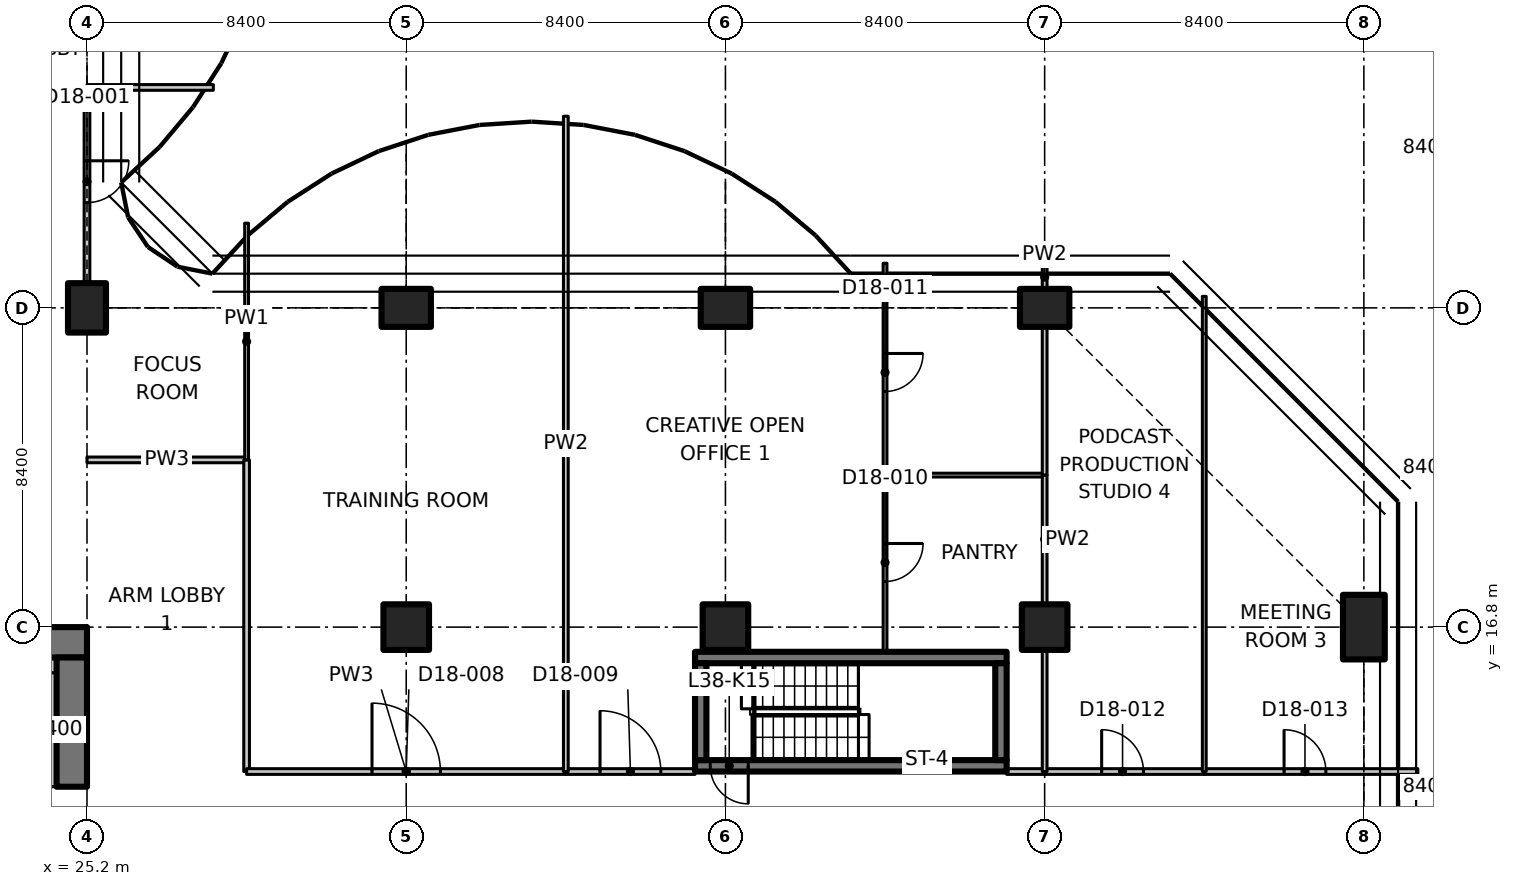
"""IFC4 building model, lengths in metres.
Left out: names, types, materials, properties, quantities, classifications, styles, units other than length and angle.
Written with IfcOpenShell. Run it as: python <this file> out.ifc"""

import sys

from ifc_helpers import new_model, si_unit, direction, frame, frame_2d, origin, origin_2d, place, context, subcontext, project, spatial, polyline, rectangle, outline, extrude, element, fill, save


model = new_model("IFC4")
c1 = context("Model", 3, precision=1e-05, world=origin(), true_north=direction((0.0, 1.0)))
c2 = subcontext(c1, "Body", "Model", "MODEL_VIEW")
j1 = project(units=[si_unit("LENGTHUNIT", "METRE"), si_unit("PLANEANGLEUNIT", "RADIAN")], contexts=[c1])
p1 = place(None, origin())
s1 = spatial("IfcSite", under=j1, at=p1, CompositionType="ELEMENT")
p2 = place(p1, origin())
s2 = spatial("IfcBuilding", under=s1, at=p2, CompositionType="ELEMENT")
p3 = place(p2, frame((0.0, 0.0, 152.9)))
s3 = spatial("IfcBuildingStorey", under=s2, at=p3, CompositionType="ELEMENT", Elevation=152.9)
p4 = place(p3, frame((25.2, 25.2, 0.0), z_axis=(0.0, 0.0, 1.0), x_axis=(1.0, 0.0, 0.0)))
e1 = element("IfcColumn", 1, at=p4, inside=s3, PredefinedType="COLUMN", context=c2, shape_type="SweptSolid", body=[
    extrude(rectangle(XDim=1.0, YDim=1.3, at=origin_2d()), origin(), (0.0, 0.0, 1.0), 3.3),
])
p5 = place(p3, frame((33.6, 16.8, 0.0), z_axis=(0.0, 0.0, 1.0), x_axis=(1.0, 0.0, 0.0)))
e2 = element("IfcColumn", 2, at=p5, inside=s3, PredefinedType="COLUMN", context=c2, shape_type="SweptSolid", body=[
    extrude(rectangle(XDim=1.2, YDim=1.2, at=origin_2d()), origin(), (0.0, 0.0, 1.0), 3.3),
])
p6 = place(p3, frame((33.6, 25.2, 0.0), z_axis=(0.0, 0.0, 1.0), x_axis=(0.0, 1.0, 0.0)))
e3 = element("IfcColumn", 3, at=p6, inside=s3, PredefinedType="COLUMN", context=c2, shape_type="SweptSolid", body=[
    extrude(rectangle(XDim=1.0, YDim=1.3, at=origin_2d()), origin(), (0.0, 0.0, 1.0), 3.3),
])
p7 = place(p3, frame((42.0, 16.8, 0.0), z_axis=(0.0, 0.0, 1.0), x_axis=(1.0, 0.0, 0.0)))
e4 = element("IfcColumn", 4, at=p7, inside=s3, PredefinedType="COLUMN", context=c2, shape_type="SweptSolid", body=[
    extrude(rectangle(XDim=1.2, YDim=1.2, at=origin_2d()), origin(), (0.0, 0.0, 1.0), 3.3),
])
p8 = place(p3, frame((42.0, 25.2, 0.0), z_axis=(0.0, 0.0, 1.0), x_axis=(0.0, 1.0, 0.0)))
e5 = element("IfcColumn", 5, at=p8, inside=s3, PredefinedType="COLUMN", context=c2, shape_type="SweptSolid", body=[
    extrude(rectangle(XDim=1.0, YDim=1.3, at=origin_2d()), origin(), (0.0, 0.0, 1.0), 3.3),
])
p9 = place(p3, frame((50.4, 16.8, 0.0), z_axis=(0.0, 0.0, 1.0), x_axis=(1.0, 0.0, 0.0)))
e6 = element("IfcColumn", 6, at=p9, inside=s3, PredefinedType="COLUMN", context=c2, shape_type="SweptSolid", body=[
    extrude(rectangle(XDim=1.2, YDim=1.2, at=origin_2d()), origin(), (0.0, 0.0, 1.0), 3.3),
])
p10 = place(p3, frame((50.4, 25.2, 0.0), z_axis=(0.0, 0.0, 1.0), x_axis=(0.0, 1.0, 0.0)))
e7 = element("IfcColumn", 7, at=p10, inside=s3, PredefinedType="COLUMN", context=c2, shape_type="SweptSolid", body=[
    extrude(rectangle(XDim=1.0, YDim=1.3, at=origin_2d()), origin(), (0.0, 0.0, 1.0), 3.3),
])
p11 = place(p3, frame((58.8, 16.8, 0.0), z_axis=(0.0, 0.0, 1.0), x_axis=(1.0, 0.0, 0.0)))
e8 = element("IfcColumn", 8, at=p11, inside=s3, PredefinedType="COLUMN", context=c2, shape_type="SweptSolid", body=[
    extrude(rectangle(XDim=1.1, YDim=1.7, at=origin_2d()), origin(), (0.0, 0.0, 1.0), 3.3),
])
p12 = place(p3, frame((23.8, 16.4, 0.0), z_axis=(0.0, 0.0, 1.0), x_axis=(1.0, 0.0, 0.0)))
e9 = element("IfcWall", 9, at=p12, inside=s3, PredefinedType="SHEAR", context=c2, shape_type="SweptSolid", body=[
    extrude(rectangle(XDim=1.4, YDim=0.8, at=frame_2d((0.7, 0.0))), origin(), (0.0, 0.0, 1.0), 3.3),
])
p13 = place(p3, frame((24.8, 12.6, 0.0), z_axis=(0.0, 0.0, 1.0), x_axis=(0.0, 1.0, 0.0)))
e10 = element("IfcWall", 10, at=p13, inside=s3, PredefinedType="SHEAR", context=c2, shape_type="SweptSolid", body=[
    extrude(rectangle(XDim=3.4, YDim=0.8, at=frame_2d((1.7, 0.0))), origin(), (0.0, 0.0, 1.0), 3.3),
])
p14 = place(p3, frame((24.2, 12.6, 0.0), z_axis=(0.0, 0.0, 1.0), x_axis=(0.0, 1.0, 0.0)))
e11 = element("IfcWall", 11, at=p14, inside=s3, PredefinedType="PARTITIONING", context=c2, shape_type="SweptSolid", body=[
    extrude(rectangle(XDim=3.0, YDim=0.4, at=frame_2d((1.5, 0.0))), origin(), (0.0, 0.0, 1.0), 3.3),
])
p15 = place(p3, frame((23.8, 15.8, 0.0), z_axis=(0.0, 0.0, 1.0), x_axis=(1.0, 0.0, 0.0)))
e12 = element("IfcWall", 12, at=p15, inside=s3, PredefinedType="PARTITIONING", context=c2, shape_type="SweptSolid", body=[
    extrude(rectangle(XDim=0.6, YDim=0.4, at=frame_2d((0.3, 0.0))), origin(), (0.0, 0.0, 1.0), 3.3),
])
p16 = place(p3, frame((49.4, 13.15, 0.0), z_axis=(0.0, 0.0, 1.0), x_axis=(-1.0, 0.0, 0.0)))
e13 = element("IfcWall", 13, at=p16, inside=s3, PredefinedType="SHEAR", context=c2, shape_type="SweptSolid", body=[
    extrude(rectangle(XDim=8.2, YDim=0.3, at=frame_2d((4.1, 0.0))), origin(), (0.0, 0.0, 1.0), 3.3),
])
p17 = place(p16, frame((6.8, 0.0, 0.0)))
e14 = element("IfcOpeningElement", 14, at=p17, cuts=e13, PredefinedType="OPENING", context=c2, shape_type="SweptSolid", body=[
    extrude(rectangle(XDim=1.0, YDim=2.1, at=frame_2d((0.5, 1.05))), frame((0.0, 0.16, 0.0), z_axis=(0.0, -1.0, 0.0), x_axis=(1.0, 0.0, 0.0)), (0.0, 0.0, 1.0), 0.32),
])
p18 = place(p3, frame((41.2, 16.0, 0.0), z_axis=(0.0, 0.0, 1.0), x_axis=(1.0, 0.0, 0.0)))
e15 = element("IfcWall", 15, at=p18, inside=s3, PredefinedType="SHEAR", context=c2, shape_type="SweptSolid", body=[
    extrude(rectangle(XDim=8.2, YDim=0.3, at=frame_2d((4.1, 0.0))), origin(), (0.0, 0.0, 1.0), 3.3),
])
for number, where, z_axis, x_axis in (
    (16, (41.35, 13.3, 0.0), (0.0, 0.0, 1.0), (0.0, 1.0, 0.0)),
    (17, (49.25, 13.3, 0.0), (0.0, 0.0, 1.0), (0.0, 1.0, 0.0)),
):
    element("IfcWall", number, at=place(p3, frame(where, z_axis=z_axis, x_axis=x_axis)), inside=s3, PredefinedType="SHEAR", context=c2, shape_type="SweptSolid", body=[
        extrude(rectangle(XDim=2.55, YDim=0.3, at=frame_2d((1.275, 0.0))), origin(), (0.0, 0.0, 1.0), 3.3),
    ])
p19 = place(p3, frame((25.2, 21.2, 0.0), z_axis=(0.0, 0.0, 1.0), x_axis=(1.0, 0.0, 0.0)))
e18 = element("IfcWall", 18, at=p19, inside=s3, PredefinedType="PARTITIONING", context=c2, shape_type="SweptSolid", body=[
    extrude(rectangle(XDim=4.2, YDim=0.15, at=frame_2d((2.1, 0.0))), origin(), (0.0, 0.0, 1.0), 3.28),
])
p20 = place(p3, frame((29.4, 21.2, 0.0), z_axis=(0.0, 0.0, 1.0), x_axis=(0.0, -1.0, 0.0)))
e19 = element("IfcWall", 19, at=p20, inside=s3, PredefinedType="PARTITIONING", context=c2, shape_type="SweptSolid", body=[
    extrude(rectangle(XDim=8.2, YDim=0.15, at=frame_2d((4.1, 0.0))), origin(), (0.0, 0.0, 1.0), 3.28),
])
p21 = place(p3, frame((29.4, 27.429, 0.0), z_axis=(0.0, 0.0, 1.0), x_axis=(0.0, -1.0, 0.0)))
e20 = element("IfcWall", 20, at=p21, inside=s3, PredefinedType="PARTITIONING", context=c2, shape_type="SweptSolid", body=[
    extrude(outline(polyline([(0.0, 0.0), (6.229, 0.0), (6.229, 3.28), (2.679, 3.28), (2.677, 2.93), (1.781, 2.93), (1.779, 3.28), (0.154, 3.28), (0.0, 3.28), (0.0, 0.0)])), frame((0.0, 0.05, 0.0), z_axis=(0.0, -1.0, 0.0), x_axis=(1.0, 0.0, 0.0)), (0.0, 0.0, 1.0), 0.1),
])
p22 = place(p3, frame((25.2, 31.0, 0.0), z_axis=(0.0, 0.0, 1.0), x_axis=(0.0, -1.0, 0.0)))
e21 = element("IfcWall", 21, at=p22, inside=s3, PredefinedType="PARTITIONING", context=c2, shape_type="SweptSolid", body=[
    extrude(outline(polyline([(0.0, 0.0), (5.13, 0.0), (5.13, 2.93), (0.0, 2.93), (0.0, 0.0)])), frame((0.0, 0.075, 0.0), z_axis=(0.0, -1.0, 0.0), x_axis=(1.0, 0.0, 0.0)), (0.0, 0.0, 1.0), 0.15),
])
p23 = place(p22, frame((1.93, 0.0, 0.0)))
e22 = element("IfcOpeningElement", 22, at=p23, cuts=e21, PredefinedType="OPENING", context=c2, shape_type="SweptSolid", body=[
    extrude(rectangle(XDim=1.1, YDim=2.1, at=frame_2d((0.55, 1.05))), frame((0.0, 0.085, 0.0), z_axis=(0.0, -1.0, 0.0), x_axis=(1.0, 0.0, 0.0)), (0.0, 0.0, 1.0), 0.17),
])
p24 = place(p3, frame((25.2, 31.0, 0.0), z_axis=(0.0, 0.0, 1.0), x_axis=(1.0, 0.0, 0.0)))
e23 = element("IfcWall", 23, at=p24, inside=s3, PredefinedType="PARTITIONING", context=c2, shape_type="SweptSolid", body=[
    extrude(rectangle(XDim=3.324, YDim=0.15, at=frame_2d((1.662, 0.0))), origin(), (0.0, 0.0, 1.0), 2.93),
])
p25 = place(p3, frame((29.4, 13.0, 0.0), z_axis=(0.0, 0.0, 1.0), x_axis=(1.0, 0.0, 0.0)))
e24 = element("IfcWall", 24, at=p25, inside=s3, PredefinedType="PARTITIONING", context=c2, shape_type="SweptSolid", body=[
    extrude(rectangle(XDim=8.4, YDim=0.15, at=frame_2d((4.2, 0.0))), origin(), (0.0, 0.0, 1.0), 3.28),
])
p26 = place(p25, frame((3.3, 0.0, 0.0)))
e25 = element("IfcOpeningElement", 25, at=p26, cuts=e24, PredefinedType="OPENING", context=c2, shape_type="SweptSolid", body=[
    extrude(rectangle(XDim=1.8, YDim=2.1, at=frame_2d((0.9, 1.05))), frame((0.0, 0.085, 0.0), z_axis=(0.0, -1.0, 0.0), x_axis=(1.0, 0.0, 0.0)), (0.0, 0.0, 1.0), 0.17),
])
p27 = place(p3, frame((37.8, 13.0, 0.0), z_axis=(0.0, 0.0, 1.0), x_axis=(1.0, 0.0, 0.0)))
e26 = element("IfcWall", 26, at=p27, inside=s3, PredefinedType="PARTITIONING", context=c2, shape_type="SweptSolid", body=[
    extrude(rectangle(XDim=3.4, YDim=0.15, at=frame_2d((1.7, 0.0))), origin(), (0.0, 0.0, 1.0), 3.28),
])
p28 = place(p27, frame((0.9, 0.0, 0.0)))
e27 = element("IfcOpeningElement", 27, at=p28, cuts=e26, PredefinedType="OPENING", context=c2, shape_type="SweptSolid", body=[
    extrude(rectangle(XDim=1.6, YDim=2.1, at=frame_2d((0.8, 1.05))), frame((0.0, 0.085, 0.0), z_axis=(0.0, -1.0, 0.0), x_axis=(1.0, 0.0, 0.0)), (0.0, 0.0, 1.0), 0.17),
])
p29 = place(p3, frame((49.4, 13.0, 0.0), z_axis=(0.0, 0.0, 1.0), x_axis=(1.0, 0.0, 0.0)))
e28 = element("IfcWall", 28, at=p29, inside=s3, PredefinedType="PARTITIONING", context=c2, shape_type="SweptSolid", body=[
    extrude(rectangle(XDim=1.0, YDim=0.15, at=frame_2d((0.5, 0.0))), origin(), (0.0, 0.0, 1.0), 3.28),
])
p30 = place(p3, frame((50.4, 13.0, 0.0), z_axis=(0.0, 0.0, 1.0), x_axis=(1.0, 0.0, 0.0)))
e29 = element("IfcWall", 29, at=p30, inside=s3, PredefinedType="PARTITIONING", context=c2, shape_type="SweptSolid", body=[
    extrude(rectangle(XDim=4.2, YDim=0.15, at=frame_2d((2.1, 0.0))), origin(), (0.0, 0.0, 1.0), 3.28),
])
p31 = place(p30, frame((1.5, 0.0, 0.0)))
e30 = element("IfcOpeningElement", 30, at=p31, cuts=e29, PredefinedType="OPENING", context=c2, shape_type="SweptSolid", body=[
    extrude(rectangle(XDim=1.1, YDim=2.1, at=frame_2d((0.55, 1.05))), frame((0.0, 0.085, 0.0), z_axis=(0.0, -1.0, 0.0), x_axis=(1.0, 0.0, 0.0)), (0.0, 0.0, 1.0), 0.17),
])
p32 = place(p3, frame((54.6, 13.0, 0.0), z_axis=(0.0, 0.0, 1.0), x_axis=(1.0, 0.0, 0.0)))
e31 = element("IfcWall", 31, at=p32, inside=s3, PredefinedType="PARTITIONING", context=c2, shape_type="SweptSolid", body=[
    extrude(outline(polyline([(0.0, 0.0), (5.619, 0.0), (5.619, 3.28), (5.28, 3.28), (4.65, 3.28), (4.648, 2.93), (3.752, 2.93), (3.75, 3.28), (0.0, 3.28), (0.0, 0.0)])), frame((0.0, 0.075, 0.0), z_axis=(0.0, -1.0, 0.0), x_axis=(1.0, 0.0, 0.0)), (0.0, 0.0, 1.0), 0.15),
])
p33 = place(p32, frame((2.1, 0.0, 0.0)))
e32 = element("IfcOpeningElement", 32, at=p33, cuts=e31, PredefinedType="OPENING", context=c2, shape_type="SweptSolid", body=[
    extrude(rectangle(XDim=1.1, YDim=2.1, at=frame_2d((0.55, 1.05))), frame((0.0, 0.085, 0.0), z_axis=(0.0, -1.0, 0.0), x_axis=(1.0, 0.0, 0.0)), (0.0, 0.0, 1.0), 0.17),
])
p34 = place(p3, frame((37.8, 30.243, 0.0), z_axis=(0.0, 0.0, 1.0), x_axis=(0.0, -1.0, 0.0)))
e33 = element("IfcWall", 33, at=p34, inside=s3, PredefinedType="PARTITIONING", context=c2, shape_type="SweptSolid", body=[
    extrude(outline(polyline([(0.0, 0.0), (17.243, 0.0), (17.243, 3.28), (5.493, 3.28), (5.491, 2.93), (4.595, 2.93), (4.593, 3.28), (0.0, 3.28), (0.0, 0.0)])), frame((0.0, 0.062, 0.0), z_axis=(0.0, -1.0, 0.0), x_axis=(1.0, 0.0, 0.0)), (0.0, 0.0, 1.0), 0.125),
])
p35 = place(p3, frame((46.2, 20.8, 0.0), z_axis=(0.0, 0.0, 1.0), x_axis=(0.0, -1.0, 0.0)))
e34 = element("IfcWall", 34, at=p35, inside=s3, PredefinedType="PARTITIONING", context=c2, shape_type="SweptSolid", body=[
    extrude(rectangle(XDim=4.65, YDim=0.1, at=frame_2d((2.325, 0.0))), origin(), (0.0, 0.0, 1.0), 3.28),
])
p36 = place(p35, frame((1.8, 0.0, 0.0)))
e35 = element("IfcOpeningElement", 35, at=p36, cuts=e34, PredefinedType="OPENING", context=c2, shape_type="SweptSolid", body=[
    extrude(rectangle(XDim=1.0, YDim=2.1, at=frame_2d((0.5, 1.05))), frame((0.0, 0.06, 0.0), z_axis=(0.0, -1.0, 0.0), x_axis=(1.0, 0.0, 0.0)), (0.0, 0.0, 1.0), 0.12),
])
p37 = place(p3, frame((46.2, 26.374, 0.0), z_axis=(0.0, 0.0, 1.0), x_axis=(0.0, -1.0, 0.0)))
e36 = element("IfcWall", 36, at=p37, inside=s3, PredefinedType="PARTITIONING", context=c2, shape_type="SweptSolid", body=[
    extrude(outline(polyline([(0.0, 0.0), (5.574, 0.0), (5.574, 3.28), (1.624, 3.28), (1.622, 2.93), (0.726, 2.93), (0.724, 3.28), (0.074, 3.28), (0.0, 3.28), (0.0, 0.0)])), frame((0.0, 0.05, 0.0), z_axis=(0.0, -1.0, 0.0), x_axis=(1.0, 0.0, 0.0)), (0.0, 0.0, 1.0), 0.1),
])
p38 = place(p37, frame((2.374, 0.0, 0.0)))
e37 = element("IfcOpeningElement", 37, at=p38, cuts=e36, PredefinedType="OPENING", context=c2, shape_type="SweptSolid", body=[
    extrude(rectangle(XDim=1.0, YDim=2.1, at=frame_2d((0.5, 1.05))), frame((0.0, 0.06, 0.0), z_axis=(0.0, -1.0, 0.0), x_axis=(1.0, 0.0, 0.0)), (0.0, 0.0, 1.0), 0.12),
])
p39 = place(p3, frame((46.2, 20.8, 0.0), z_axis=(0.0, 0.0, 1.0), x_axis=(1.0, 0.0, 0.0)))
e38 = element("IfcWall", 38, at=p39, inside=s3, PredefinedType="PARTITIONING", context=c2, shape_type="SweptSolid", body=[
    extrude(rectangle(XDim=4.2, YDim=0.1, at=frame_2d((2.1, 0.0))), origin(), (0.0, 0.0, 1.0), 3.28),
])
p40 = place(p3, frame((50.4, 20.8, 0.0), z_axis=(0.0, 0.0, 1.0), x_axis=(0.0, -1.0, 0.0)))
e39 = element("IfcWall", 39, at=p40, inside=s3, PredefinedType="PARTITIONING", context=c2, shape_type="SweptSolid", body=[
    extrude(rectangle(XDim=3.38, YDim=0.125, at=frame_2d((1.69, 0.0))), origin(), (0.0, 0.0, 1.0), 3.28),
])
p41 = place(p3, frame((50.4, 16.18, 0.0), z_axis=(0.0, 0.0, 1.0), x_axis=(0.0, -1.0, 0.0)))
e40 = element("IfcWall", 40, at=p41, inside=s3, PredefinedType="PARTITIONING", context=c2, shape_type="SweptSolid", body=[
    extrude(rectangle(XDim=3.18, YDim=0.125, at=frame_2d((1.59, 0.0))), origin(), (0.0, 0.0, 1.0), 3.28),
])
p42 = place(p3, frame((50.4, 26.3, 0.0), z_axis=(0.0, 0.0, 1.0), x_axis=(0.0, -1.0, 0.0)))
e41 = element("IfcWall", 41, at=p42, inside=s3, PredefinedType="PARTITIONING", context=c2, shape_type="SweptSolid", body=[
    extrude(rectangle(XDim=0.58, YDim=0.125, at=frame_2d((0.29, 0.0))), origin(), (0.0, 0.0, 1.0), 3.28),
])
p43 = place(p3, frame((50.4, 24.68, 0.0), z_axis=(0.0, 0.0, 1.0), x_axis=(0.0, -1.0, 0.0)))
e42 = element("IfcWall", 42, at=p43, inside=s3, PredefinedType="PARTITIONING", context=c2, shape_type="SweptSolid", body=[
    extrude(rectangle(XDim=3.88, YDim=0.125, at=frame_2d((1.94, 0.0))), origin(), (0.0, 0.0, 1.0), 2.93),
])
p44 = place(p3, frame((54.6, 25.502, 0.0), z_axis=(0.0, 0.0, 1.0), x_axis=(0.0, -1.0, 0.0)))
e43 = element("IfcWall", 43, at=p44, inside=s3, PredefinedType="PARTITIONING", context=c2, shape_type="SweptSolid", body=[
    extrude(outline(polyline([(0.0, 0.0), (12.502, 0.0), (12.502, 3.28), (5.168, 3.28), (5.166, 2.93), (3.839, 2.93), (3.837, 3.28), (0.103, 3.28), (0.0, 3.28), (0.0, 0.0)])), frame((0.0, 0.05, 0.0), z_axis=(0.0, -1.0, 0.0), x_axis=(1.0, 0.0, 0.0)), (0.0, 0.0, 1.0), 0.1),
])
p45 = place(p17, origin())
e44 = element("IfcDoor", 44, at=p45, inside=s3, OperationType="SINGLE_SWING_LEFT", PredefinedType="DOOR", context=c2, shape_type="SweptSolid", body=[
    extrude(rectangle(XDim=1.0, YDim=2.1, at=frame_2d((0.5, 1.05))), frame((0.0, 0.025, 0.0), z_axis=(0.0, -1.0, 0.0), x_axis=(1.0, 0.0, 0.0)), (0.0, 0.0, 1.0), 0.05),
])
fill(e14, e44)
p46 = place(p23, origin())
e45 = element("IfcDoor", 45, at=p46, inside=s3, OperationType="SINGLE_SWING_RIGHT", PredefinedType="DOOR", context=c2, shape_type="SweptSolid", body=[
    extrude(rectangle(XDim=1.1, YDim=2.1, at=frame_2d((0.55, 1.05))), frame((0.0, 0.025, 0.0), z_axis=(0.0, -1.0, 0.0), x_axis=(1.0, 0.0, 0.0)), (0.0, 0.0, 1.0), 0.05),
])
fill(e22, e45)
p47 = place(p26, origin())
e46 = element("IfcDoor", 46, at=p47, inside=s3, OperationType="DOUBLE_DOOR_SINGLE_SWING", PredefinedType="DOOR", context=c2, shape_type="SweptSolid", body=[
    extrude(rectangle(XDim=1.8, YDim=2.1, at=frame_2d((0.9, 1.05))), frame((0.0, 0.025, 0.0), z_axis=(0.0, -1.0, 0.0), x_axis=(1.0, 0.0, 0.0)), (0.0, 0.0, 1.0), 0.05),
])
fill(e25, e46)
p48 = place(p28, origin())
e47 = element("IfcDoor", 47, at=p48, inside=s3, OperationType="DOUBLE_DOOR_SINGLE_SWING", PredefinedType="DOOR", context=c2, shape_type="SweptSolid", body=[
    extrude(rectangle(XDim=1.6, YDim=2.1, at=frame_2d((0.8, 1.05))), frame((0.0, 0.025, 0.0), z_axis=(0.0, -1.0, 0.0), x_axis=(1.0, 0.0, 0.0)), (0.0, 0.0, 1.0), 0.05),
])
fill(e27, e47)
p49 = place(p36, origin())
e48 = element("IfcDoor", 48, at=p49, inside=s3, OperationType="SINGLE_SWING_LEFT", PredefinedType="DOOR", context=c2, shape_type="SweptSolid", body=[
    extrude(rectangle(XDim=1.0, YDim=2.1, at=frame_2d((0.5, 1.05))), frame((0.0, 0.025, 0.0), z_axis=(0.0, -1.0, 0.0), x_axis=(1.0, 0.0, 0.0)), (0.0, 0.0, 1.0), 0.05),
])
fill(e35, e48)
p50 = place(p38, origin())
e49 = element("IfcDoor", 49, at=p50, inside=s3, OperationType="SINGLE_SWING_LEFT", PredefinedType="DOOR", context=c2, shape_type="SweptSolid", body=[
    extrude(rectangle(XDim=1.0, YDim=2.1, at=frame_2d((0.5, 1.05))), frame((0.0, 0.025, 0.0), z_axis=(0.0, -1.0, 0.0), x_axis=(1.0, 0.0, 0.0)), (0.0, 0.0, 1.0), 0.05),
])
fill(e37, e49)
p51 = place(p31, origin())
e50 = element("IfcDoor", 50, at=p51, inside=s3, OperationType="SINGLE_SWING_LEFT", PredefinedType="DOOR", context=c2, shape_type="SweptSolid", body=[
    extrude(rectangle(XDim=1.1, YDim=2.1, at=frame_2d((0.55, 1.05))), frame((0.0, 0.025, 0.0), z_axis=(0.0, -1.0, 0.0), x_axis=(1.0, 0.0, 0.0)), (0.0, 0.0, 1.0), 0.05),
])
fill(e30, e50)
p52 = place(p33, origin())
e51 = element("IfcDoor", 51, at=p52, inside=s3, OperationType="SINGLE_SWING_LEFT", PredefinedType="DOOR", context=c2, shape_type="SweptSolid", body=[
    extrude(rectangle(XDim=1.1, YDim=2.1, at=frame_2d((0.55, 1.05))), frame((0.0, 0.025, 0.0), z_axis=(0.0, -1.0, 0.0), x_axis=(1.0, 0.0, 0.0)), (0.0, 0.0, 1.0), 0.05),
])
fill(e32, e51)
save(model, sys.argv[1])
